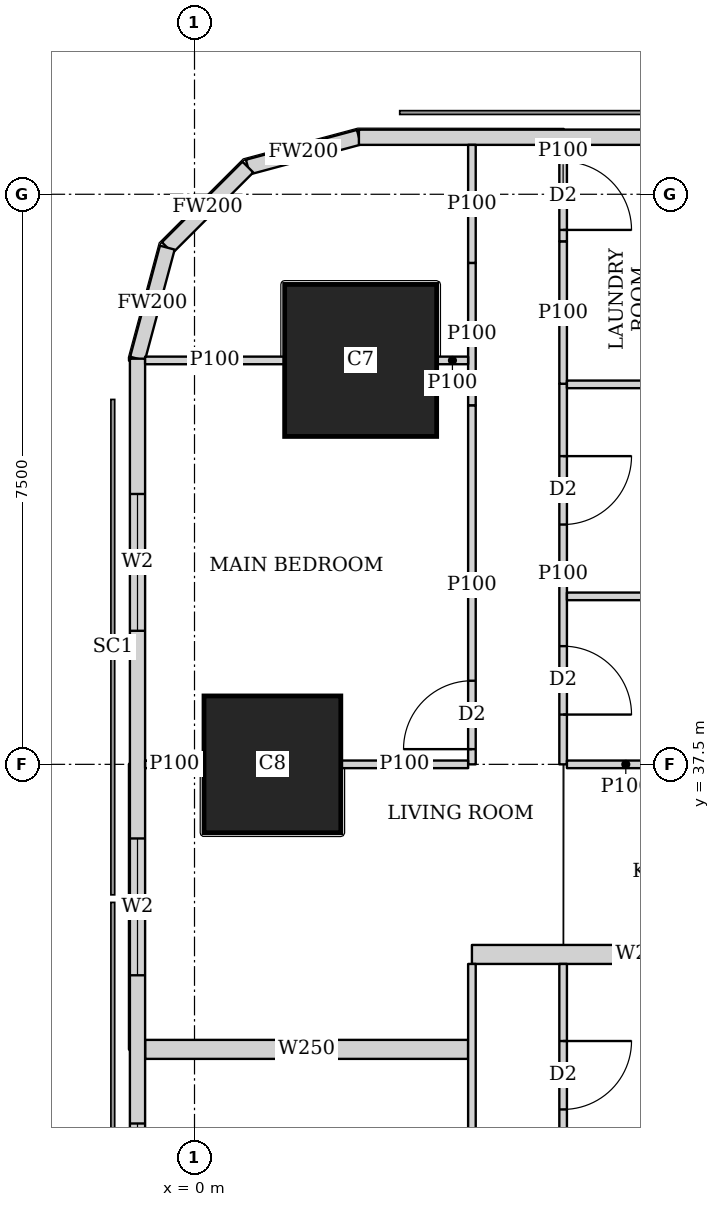
"""IFC4 building model, lengths in metres.
Left out: names, types, materials, properties, quantities, classifications, styles, units other than length and angle.
Written with IfcOpenShell. Run it as: python <this file> out.ifc"""

import sys

from ifc_helpers import new_model, si_unit, direction, frame, frame_2d, origin, origin_2d, place, context, subcontext, project, spatial, rectangle, extrude, element, fill, save


model = new_model("IFC4")
c1 = context("Model", 3, precision=1e-05, world=origin(), true_north=direction((0.0, 1.0)))
c2 = subcontext(c1, "Body", "Model", "MODEL_VIEW")
j1 = project(units=[si_unit("LENGTHUNIT", "METRE"), si_unit("PLANEANGLEUNIT", "RADIAN")], contexts=[c1])
p1 = place(None, origin())
s1 = spatial("IfcSite", under=j1, at=p1, CompositionType="ELEMENT")
p2 = place(p1, origin())
s2 = spatial("IfcBuilding", under=s1, at=p2, CompositionType="ELEMENT")
p3 = place(p2, frame((0.0, 0.0, 169.55)))
s3 = spatial("IfcBuildingStorey", under=s2, at=p3, CompositionType="ELEMENT", Elevation=169.55)
p4 = place(p3, frame((1.025, 37.5, 0.0), z_axis=(0.0, 0.0, 1.0), x_axis=(1.0, 0.0, 0.0)))
e1 = element("IfcColumn", 1, at=p4, inside=s3, PredefinedType="COLUMN", context=c2, shape_type="SweptSolid", body=[
    extrude(rectangle(XDim=1.8, YDim=1.8, at=origin_2d()), origin(), (0.0, 0.0, 1.0), 3.75),
])
p5 = place(p3, frame((2.186, 42.814, 0.0), z_axis=(0.0, 0.0, 1.0), x_axis=(1.0, 0.0, 0.0)))
e2 = element("IfcColumn", 2, at=p5, inside=s3, PredefinedType="COLUMN", context=c2, shape_type="SweptSolid", body=[
    extrude(rectangle(XDim=2.0, YDim=2.0, at=origin_2d()), origin(), (0.0, 0.0, 1.0), 3.75),
])
p6 = place(p3, frame((40.106, 45.75, 0.0), z_axis=(0.0, 0.0, 1.0), x_axis=(-1.0, 0.0, 0.0)))
e3 = element("IfcWall", 3, at=p6, inside=s3, PredefinedType="SOLIDWALL", context=c2, shape_type="SweptSolid", body=[
    extrude(rectangle(XDim=37.943, YDim=0.2, at=frame_2d((18.971, 0.0))), origin(), (0.0, 0.0, 1.0), 3.5),
])
p7 = place(p6, frame((8.606, 0.0, 0.9)))
e4 = element("IfcOpeningElement", 4, at=p7, cuts=e3, PredefinedType="OPENING", context=c2, shape_type="SweptSolid", body=[
    extrude(rectangle(XDim=1.8, YDim=1.5, at=frame_2d((0.9, 0.75))), frame((0.0, 0.11, 0.0), z_axis=(0.0, -1.0, 0.0), x_axis=(1.0, 0.0, 0.0)), (0.0, 0.0, 1.0), 0.22),
])
p8 = place(p6, frame((12.206, 0.0, 0.9)))
e5 = element("IfcOpeningElement", 5, at=p8, cuts=e3, PredefinedType="OPENING", context=c2, shape_type="SweptSolid", body=[
    extrude(rectangle(XDim=1.8, YDim=1.5, at=frame_2d((0.9, 0.75))), frame((0.0, 0.11, 0.0), z_axis=(0.0, -1.0, 0.0), x_axis=(1.0, 0.0, 0.0)), (0.0, 0.0, 1.0), 0.22),
])
p9 = place(p6, frame((15.806, 0.0, 0.9)))
e6 = element("IfcOpeningElement", 6, at=p9, cuts=e3, PredefinedType="OPENING", context=c2, shape_type="SweptSolid", body=[
    extrude(rectangle(XDim=1.8, YDim=1.5, at=frame_2d((0.9, 0.75))), frame((0.0, 0.11, 0.0), z_axis=(0.0, -1.0, 0.0), x_axis=(1.0, 0.0, 0.0)), (0.0, 0.0, 1.0), 0.22),
])
p10 = place(p6, frame((19.406, 0.0, 0.9)))
e7 = element("IfcOpeningElement", 7, at=p10, cuts=e3, PredefinedType="OPENING", context=c2, shape_type="SweptSolid", body=[
    extrude(rectangle(XDim=1.8, YDim=1.5, at=frame_2d((0.9, 0.75))), frame((0.0, 0.11, 0.0), z_axis=(0.0, -1.0, 0.0), x_axis=(1.0, 0.0, 0.0)), (0.0, 0.0, 1.0), 0.22),
])
p11 = place(p6, frame((23.006, 0.0, 0.9)))
e8 = element("IfcOpeningElement", 8, at=p11, cuts=e3, PredefinedType="OPENING", context=c2, shape_type="SweptSolid", body=[
    extrude(rectangle(XDim=1.8, YDim=1.5, at=frame_2d((0.9, 0.75))), frame((0.0, 0.11, 0.0), z_axis=(0.0, -1.0, 0.0), x_axis=(1.0, 0.0, 0.0)), (0.0, 0.0, 1.0), 0.22),
])
p12 = place(p6, frame((26.606, 0.0, 0.9)))
e9 = element("IfcOpeningElement", 9, at=p12, cuts=e3, PredefinedType="OPENING", context=c2, shape_type="SweptSolid", body=[
    extrude(rectangle(XDim=1.8, YDim=1.5, at=frame_2d((0.9, 0.75))), frame((0.0, 0.11, 0.0), z_axis=(0.0, -1.0, 0.0), x_axis=(1.0, 0.0, 0.0)), (0.0, 0.0, 1.0), 0.22),
])
p13 = place(p3, frame((2.163, 45.75, 0.0), z_axis=(0.0, 0.0, 1.0), x_axis=(-0.965832000415, -0.259168954497, 0.0)))
e10 = element("IfcWall", 10, at=p13, inside=s3, PredefinedType="SOLIDWALL", context=c2, shape_type="SweptSolid", body=[
    extrude(rectangle(XDim=1.513, YDim=0.2, at=frame_2d((0.756, 0.0))), origin(), (0.0, 0.0, 1.0), 3.5),
])
p14 = place(p3, frame((0.702, 45.358, 0.0), z_axis=(0.0, 0.0, 1.0), x_axis=(-0.707106781187, -0.707106781187, 0.0)))
e11 = element("IfcWall", 11, at=p14, inside=s3, PredefinedType="SOLIDWALL", context=c2, shape_type="SweptSolid", body=[
    extrude(rectangle(XDim=1.499, YDim=0.2, at=frame_2d((0.75, 0.0))), origin(), (0.0, 0.0, 1.0), 3.5),
])
p15 = place(p3, frame((-0.358, 44.298, 0.0), z_axis=(0.0, 0.0, 1.0), x_axis=(-0.259168954497, -0.965832000415, 0.0)))
e12 = element("IfcWall", 12, at=p15, inside=s3, PredefinedType="SOLIDWALL", context=c2, shape_type="SweptSolid", body=[
    extrude(rectangle(XDim=1.513, YDim=0.2, at=frame_2d((0.756, 0.0))), origin(), (0.0, 0.0, 1.0), 3.5),
])
p16 = place(p3, frame((-0.75, 42.837, 0.0), z_axis=(0.0, 0.0, 1.0), x_axis=(0.0, -1.0, 0.0)))
e13 = element("IfcWall", 13, at=p16, inside=s3, PredefinedType="SOLIDWALL", context=c2, shape_type="SweptSolid", body=[
    extrude(rectangle(XDim=40.674, YDim=0.2, at=frame_2d((20.337, 0.0))), origin(), (0.0, 0.0, 1.0), 3.5),
])
p17 = place(p16, frame((1.78, 0.0, 0.9)))
e14 = element("IfcOpeningElement", 14, at=p17, cuts=e13, PredefinedType="OPENING", context=c2, shape_type="SweptSolid", body=[
    extrude(rectangle(XDim=1.8, YDim=1.5, at=frame_2d((0.9, 0.75))), frame((0.0, 0.11, 0.0), z_axis=(0.0, -1.0, 0.0), x_axis=(1.0, 0.0, 0.0)), (0.0, 0.0, 1.0), 0.22),
])
p18 = place(p16, frame((6.312, 0.0, 0.9)))
e15 = element("IfcOpeningElement", 15, at=p18, cuts=e13, PredefinedType="OPENING", context=c2, shape_type="SweptSolid", body=[
    extrude(rectangle(XDim=1.8, YDim=1.5, at=frame_2d((0.9, 0.75))), frame((0.0, 0.11, 0.0), z_axis=(0.0, -1.0, 0.0), x_axis=(1.0, 0.0, 0.0)), (0.0, 0.0, 1.0), 0.22),
])
p19 = place(p16, frame((10.062, 0.0, 0.9)))
e16 = element("IfcOpeningElement", 16, at=p19, cuts=e13, PredefinedType="OPENING", context=c2, shape_type="SweptSolid", body=[
    extrude(rectangle(XDim=1.8, YDim=1.5, at=frame_2d((0.9, 0.75))), frame((0.0, 0.11, 0.0), z_axis=(0.0, -1.0, 0.0), x_axis=(1.0, 0.0, 0.0)), (0.0, 0.0, 1.0), 0.22),
])
p20 = place(p16, frame((13.812, 0.0, 0.9)))
e17 = element("IfcOpeningElement", 17, at=p20, cuts=e13, PredefinedType="OPENING", context=c2, shape_type="SweptSolid", body=[
    extrude(rectangle(XDim=1.8, YDim=1.5, at=frame_2d((0.9, 0.75))), frame((0.0, 0.11, 0.0), z_axis=(0.0, -1.0, 0.0), x_axis=(1.0, 0.0, 0.0)), (0.0, 0.0, 1.0), 0.22),
])
p21 = place(p16, frame((17.562, 0.0, 0.9)))
e18 = element("IfcOpeningElement", 18, at=p21, cuts=e13, PredefinedType="OPENING", context=c2, shape_type="SweptSolid", body=[
    extrude(rectangle(XDim=1.8, YDim=1.5, at=frame_2d((0.9, 0.75))), frame((0.0, 0.11, 0.0), z_axis=(0.0, -1.0, 0.0), x_axis=(1.0, 0.0, 0.0)), (0.0, 0.0, 1.0), 0.22),
])
p22 = place(p16, frame((21.312, 0.0, 0.9)))
e19 = element("IfcOpeningElement", 19, at=p22, cuts=e13, PredefinedType="OPENING", context=c2, shape_type="SweptSolid", body=[
    extrude(rectangle(XDim=1.8, YDim=1.5, at=frame_2d((0.9, 0.75))), frame((0.0, 0.11, 0.0), z_axis=(0.0, -1.0, 0.0), x_axis=(1.0, 0.0, 0.0)), (0.0, 0.0, 1.0), 0.22),
])
p23 = place(p16, frame((25.062, 0.0, 0.9)))
e20 = element("IfcOpeningElement", 20, at=p23, cuts=e13, PredefinedType="OPENING", context=c2, shape_type="SweptSolid", body=[
    extrude(rectangle(XDim=1.8, YDim=1.5, at=frame_2d((0.9, 0.75))), frame((0.0, 0.11, 0.0), z_axis=(0.0, -1.0, 0.0), x_axis=(1.0, 0.0, 0.0)), (0.0, 0.0, 1.0), 0.22),
])
p24 = place(p16, frame((28.812, 0.0, 0.9)))
e21 = element("IfcOpeningElement", 21, at=p24, cuts=e13, PredefinedType="OPENING", context=c2, shape_type="SweptSolid", body=[
    extrude(rectangle(XDim=1.8, YDim=1.5, at=frame_2d((0.9, 0.75))), frame((0.0, 0.11, 0.0), z_axis=(0.0, -1.0, 0.0), x_axis=(1.0, 0.0, 0.0)), (0.0, 0.0, 1.0), 0.22),
])
p25 = place(p16, frame((32.562, 0.0, 0.9)))
e22 = element("IfcOpeningElement", 22, at=p25, cuts=e13, PredefinedType="OPENING", context=c2, shape_type="SweptSolid", body=[
    extrude(rectangle(XDim=1.8, YDim=1.5, at=frame_2d((0.9, 0.75))), frame((0.0, 0.11, 0.0), z_axis=(0.0, -1.0, 0.0), x_axis=(1.0, 0.0, 0.0)), (0.0, 0.0, 1.0), 0.22),
])
p26 = place(p16, frame((37.094, 0.0, 0.9)))
e23 = element("IfcOpeningElement", 23, at=p26, cuts=e13, PredefinedType="OPENING", context=c2, shape_type="SweptSolid", body=[
    extrude(rectangle(XDim=1.8, YDim=1.5, at=frame_2d((0.9, 0.75))), frame((0.0, 0.11, 0.0), z_axis=(0.0, -1.0, 0.0), x_axis=(1.0, 0.0, 0.0)), (0.0, 0.0, 1.0), 0.22),
])
p27 = place(p3, frame((3.65, 26.25, 0.0), z_axis=(0.0, 0.0, 1.0), x_axis=(0.0, 1.0, 0.0)))
e24 = element("IfcWall", 24, at=p27, inside=s3, PredefinedType="PARTITIONING", context=c2, shape_type="SweptSolid", body=[
    extrude(rectangle(XDim=8.624, YDim=0.1, at=frame_2d((4.312, 0.0))), origin(), (0.0, 0.0, 1.0), 3.5),
])
p28 = place(p27, frame((1.449, 0.0, 0.0)))
e25 = element("IfcOpeningElement", 25, at=p28, cuts=e24, PredefinedType="OPENING", context=c2, shape_type="SweptSolid", body=[
    extrude(rectangle(XDim=0.9, YDim=2.1, at=frame_2d((0.45, 1.05))), frame((0.0, 0.06, 0.0), z_axis=(0.0, -1.0, 0.0), x_axis=(1.0, 0.0, 0.0)), (0.0, 0.0, 1.0), 0.12),
])
p29 = place(p27, frame((3.95, 0.0, 0.0)))
e26 = element("IfcOpeningElement", 26, at=p29, cuts=e24, PredefinedType="OPENING", context=c2, shape_type="SweptSolid", body=[
    extrude(rectangle(XDim=0.9, YDim=2.1, at=frame_2d((0.45, 1.05))), frame((0.0, 0.06, 0.0), z_axis=(0.0, -1.0, 0.0), x_axis=(1.0, 0.0, 0.0)), (0.0, 0.0, 1.0), 0.12),
])
p30 = place(p3, frame((4.85, 27.499, 0.0), z_axis=(0.0, 0.0, 1.0), x_axis=(0.0, 1.0, 0.0)))
e27 = element("IfcWall", 27, at=p30, inside=s3, PredefinedType="PARTITIONING", context=c2, shape_type="SweptSolid", body=[
    extrude(rectangle(XDim=7.375, YDim=0.1, at=frame_2d((3.688, 0.0))), origin(), (0.0, 0.0, 1.0), 3.5),
])
p31 = place(p30, frame((0.8, 0.0, 0.0)))
e28 = element("IfcOpeningElement", 28, at=p31, cuts=e27, PredefinedType="OPENING", context=c2, shape_type="SweptSolid", body=[
    extrude(rectangle(XDim=0.9, YDim=2.1, at=frame_2d((0.45, 1.05))), frame((0.0, 0.06, 0.0), z_axis=(0.0, -1.0, 0.0), x_axis=(1.0, 0.0, 0.0)), (0.0, 0.0, 1.0), 0.12),
])
p32 = place(p30, frame((2.961, 0.0, 0.0)))
e29 = element("IfcOpeningElement", 29, at=p32, cuts=e27, PredefinedType="OPENING", context=c2, shape_type="SweptSolid", body=[
    extrude(rectangle(XDim=0.9, YDim=2.1, at=frame_2d((0.45, 1.05))), frame((0.0, 0.06, 0.0), z_axis=(0.0, -1.0, 0.0), x_axis=(1.0, 0.0, 0.0)), (0.0, 0.0, 1.0), 0.12),
])
p33 = place(p30, frame((5.461, 0.0, 0.0)))
e30 = element("IfcOpeningElement", 30, at=p33, cuts=e27, PredefinedType="OPENING", context=c2, shape_type="SweptSolid", body=[
    extrude(rectangle(XDim=0.9, YDim=2.1, at=frame_2d((0.45, 1.05))), frame((0.0, 0.06, 0.0), z_axis=(0.0, -1.0, 0.0), x_axis=(1.0, 0.0, 0.0)), (0.0, 0.0, 1.0), 0.12),
])
p34 = place(p3, frame((3.65, 37.5, 0.0), z_axis=(0.0, 0.0, 1.0), x_axis=(0.0, 1.0, 0.0)))
e31 = element("IfcWall", 31, at=p34, inside=s3, PredefinedType="PARTITIONING", context=c2, shape_type="SweptSolid", body=[
    extrude(rectangle(XDim=4.724, YDim=0.1, at=frame_2d((2.362, 0.0))), origin(), (0.0, 0.0, 1.0), 3.5),
])
p35 = place(p34, frame((0.2, 0.0, 0.0)))
e32 = element("IfcOpeningElement", 32, at=p35, cuts=e31, PredefinedType="OPENING", context=c2, shape_type="SweptSolid", body=[
    extrude(rectangle(XDim=0.9, YDim=2.1, at=frame_2d((0.45, 1.05))), frame((0.0, 0.06, 0.0), z_axis=(0.0, -1.0, 0.0), x_axis=(1.0, 0.0, 0.0)), (0.0, 0.0, 1.0), 0.12),
])
p36 = place(p3, frame((3.65, 42.224, 0.0), z_axis=(0.0, 0.0, 1.0), x_axis=(0.0, 1.0, 0.0)))
e33 = element("IfcWall", 33, at=p36, inside=s3, PredefinedType="PARTITIONING", context=c2, shape_type="SweptSolid", body=[
    extrude(rectangle(XDim=1.873, YDim=0.1, at=frame_2d((0.937, 0.0))), origin(), (0.0, 0.0, 1.0), 2.1),
])
p37 = place(p3, frame((3.65, 44.097, 0.0), z_axis=(0.0, 0.0, 1.0), x_axis=(0.0, 1.0, 0.0)))
e34 = element("IfcWall", 34, at=p37, inside=s3, PredefinedType="PARTITIONING", context=c2, shape_type="SweptSolid", body=[
    extrude(rectangle(XDim=1.553, YDim=0.1, at=frame_2d((0.776, 0.0))), origin(), (0.0, 0.0, 1.0), 3.5),
])
p38 = place(p3, frame((4.85, 37.5, 0.0), z_axis=(0.0, 0.0, 1.0), x_axis=(0.0, 1.0, 0.0)))
e35 = element("IfcWall", 35, at=p38, inside=s3, PredefinedType="PARTITIONING", context=c2, shape_type="SweptSolid", body=[
    extrude(rectangle(XDim=5.007, YDim=0.1, at=frame_2d((2.503, 0.0))), origin(), (0.0, 0.0, 1.0), 3.5),
])
p39 = place(p38, frame((0.655, 0.0, 0.0)))
e36 = element("IfcOpeningElement", 36, at=p39, cuts=e35, PredefinedType="OPENING", context=c2, shape_type="SweptSolid", body=[
    extrude(rectangle(XDim=0.9, YDim=2.1, at=frame_2d((0.45, 1.05))), frame((0.0, 0.06, 0.0), z_axis=(0.0, -1.0, 0.0), x_axis=(1.0, 0.0, 0.0)), (0.0, 0.0, 1.0), 0.12),
])
p40 = place(p38, frame((3.155, 0.0, 0.0)))
e37 = element("IfcOpeningElement", 37, at=p40, cuts=e35, PredefinedType="OPENING", context=c2, shape_type="SweptSolid", body=[
    extrude(rectangle(XDim=0.9, YDim=2.1, at=frame_2d((0.45, 1.05))), frame((0.0, 0.06, 0.0), z_axis=(0.0, -1.0, 0.0), x_axis=(1.0, 0.0, 0.0)), (0.0, 0.0, 1.0), 0.12),
])
p41 = place(p3, frame((4.85, 42.507, 0.0), z_axis=(0.0, 0.0, 1.0), x_axis=(0.0, 1.0, 0.0)))
e38 = element("IfcWall", 38, at=p41, inside=s3, PredefinedType="PARTITIONING", context=c2, shape_type="SweptSolid", body=[
    extrude(rectangle(XDim=1.874, YDim=0.1, at=frame_2d((0.937, 0.0))), origin(), (0.0, 0.0, 1.0), 2.1),
])
p42 = place(p3, frame((4.85, 44.381, 0.0), z_axis=(0.0, 0.0, 1.0), x_axis=(0.0, 1.0, 0.0)))
e39 = element("IfcWall", 39, at=p42, inside=s3, PredefinedType="PARTITIONING", context=c2, shape_type="SweptSolid", body=[
    extrude(rectangle(XDim=1.269, YDim=0.1, at=frame_2d((0.634, 0.0))), origin(), (0.0, 0.0, 1.0), 3.5),
])
p43 = place(p42, frame((0.15, 0.0, 0.0)))
e40 = element("IfcOpeningElement", 40, at=p43, cuts=e39, PredefinedType="OPENING", context=c2, shape_type="SweptSolid", body=[
    extrude(rectangle(XDim=0.9, YDim=2.1, at=frame_2d((0.45, 1.05))), frame((0.0, 0.06, 0.0), z_axis=(0.0, -1.0, 0.0), x_axis=(1.0, 0.0, 0.0)), (0.0, 0.0, 1.0), 0.12),
])
p44 = place(p3, frame((-0.65, 37.5, 0.0), z_axis=(0.0, 0.0, 1.0), x_axis=(1.0, 0.0, 0.0)))
e41 = element("IfcWall", 41, at=p44, inside=s3, PredefinedType="PARTITIONING", context=c2, shape_type="SweptSolid", body=[
    extrude(rectangle(XDim=0.774, YDim=0.1, at=frame_2d((0.387, 0.0))), origin(), (0.0, 0.0, 1.0), 3.5),
])
p45 = place(p3, frame((1.926, 37.5, 0.0), z_axis=(0.0, 0.0, 1.0), x_axis=(1.0, 0.0, 0.0)))
e42 = element("IfcWall", 42, at=p45, inside=s3, PredefinedType="PARTITIONING", context=c2, shape_type="SweptSolid", body=[
    extrude(rectangle(XDim=1.674, YDim=0.1, at=frame_2d((0.837, 0.0))), origin(), (0.0, 0.0, 1.0), 2.1),
])
p46 = place(p3, frame((-0.65, 42.814, 0.0), z_axis=(0.0, 0.0, 1.0), x_axis=(1.0, 0.0, 0.0)))
e43 = element("IfcWall", 43, at=p46, inside=s3, PredefinedType="PARTITIONING", context=c2, shape_type="SweptSolid", body=[
    extrude(rectangle(XDim=1.835, YDim=0.1, at=frame_2d((0.917, 0.0))), origin(), (0.0, 0.0, 1.0), 3.5),
])
p47 = place(p3, frame((3.187, 42.814, 0.0), z_axis=(0.0, 0.0, 1.0), x_axis=(1.0, 0.0, 0.0)))
e44 = element("IfcWall", 44, at=p47, inside=s3, PredefinedType="PARTITIONING", context=c2, shape_type="SweptSolid", body=[
    extrude(rectangle(XDim=0.413, YDim=0.1, at=frame_2d((0.207, 0.0))), origin(), (0.0, 0.0, 1.0), 2.1),
])
p48 = place(p3, frame((4.9, 37.5, 0.0), z_axis=(0.0, 0.0, 1.0), x_axis=(1.0, 0.0, 0.0)))
e45 = element("IfcWall", 45, at=p48, inside=s3, PredefinedType="PARTITIONING", context=c2, shape_type="SweptSolid", body=[
    extrude(rectangle(XDim=1.549, YDim=0.1, at=frame_2d((0.774, 0.0))), origin(), (0.0, 0.0, 1.0), 3.5),
])
for number, where, z_axis, x_axis in (
    (46, (4.9, 42.499, 0.0), (0.0, 0.0, 1.0), (1.0, 0.0, 0.0)),
    (47, (4.9, 39.71, 0.0), (0.0, 0.0, 1.0), (1.0, 0.0, 0.0)),
):
    element("IfcWall", number, at=place(p3, frame(where, z_axis=z_axis, x_axis=x_axis)), inside=s3, PredefinedType="PARTITIONING", context=c2, shape_type="SweptSolid", body=[
        extrude(rectangle(XDim=3.275, YDim=0.1, at=frame_2d((1.638, 0.0))), origin(), (0.0, 0.0, 1.0), 3.5),
    ])
p49 = place(p3, frame((-0.65, 33.75, 0.0), z_axis=(0.0, 0.0, 1.0), x_axis=(1.0, 0.0, 0.0)))
e48 = element("IfcWall", 48, at=p49, inside=s3, PredefinedType="SOLIDWALL", context=c2, shape_type="SweptSolid", body=[
    extrude(rectangle(XDim=4.25, YDim=0.25, at=frame_2d((2.125, 0.0))), origin(), (0.0, 0.0, 1.0), 2.1),
])
p50 = place(p3, frame((3.65, 34.999, 0.0), z_axis=(0.0, 0.0, 1.0), x_axis=(1.0, 0.0, 0.0)))
e49 = element("IfcWall", 49, at=p50, inside=s3, PredefinedType="SOLIDWALL", context=c2, shape_type="SweptSolid", body=[
    extrude(rectangle(XDim=4.525, YDim=0.25, at=frame_2d((2.263, 0.0))), origin(), (0.0, 0.0, 1.0), 3.5),
])
p51 = place(p17, origin())
e50 = element("IfcWindow", 50, at=p51, inside=s3, PartitioningType="SINGLE_PANEL", PredefinedType="WINDOW", context=c2, shape_type="SweptSolid", body=[
    extrude(rectangle(XDim=1.8, YDim=1.5, at=frame_2d((0.9, 0.75))), frame((0.0, 0.03, 0.0), z_axis=(0.0, -1.0, 0.0), x_axis=(1.0, 0.0, 0.0)), (0.0, 0.0, 1.0), 0.06),
])
fill(e14, e50)
p52 = place(p18, origin())
e51 = element("IfcWindow", 51, at=p52, inside=s3, PartitioningType="SINGLE_PANEL", PredefinedType="WINDOW", context=c2, shape_type="SweptSolid", body=[
    extrude(rectangle(XDim=1.8, YDim=1.5, at=frame_2d((0.9, 0.75))), frame((0.0, 0.03, 0.0), z_axis=(0.0, -1.0, 0.0), x_axis=(1.0, 0.0, 0.0)), (0.0, 0.0, 1.0), 0.06),
])
fill(e15, e51)
p53 = place(p19, origin())
e52 = element("IfcWindow", 52, at=p53, inside=s3, PartitioningType="SINGLE_PANEL", PredefinedType="WINDOW", context=c2, shape_type="SweptSolid", body=[
    extrude(rectangle(XDim=1.8, YDim=1.5, at=frame_2d((0.9, 0.75))), frame((0.0, 0.03, 0.0), z_axis=(0.0, -1.0, 0.0), x_axis=(1.0, 0.0, 0.0)), (0.0, 0.0, 1.0), 0.06),
])
fill(e16, e52)
p54 = place(p33, origin())
e53 = element("IfcDoor", 53, at=p54, inside=s3, OperationType="SINGLE_SWING_LEFT", PredefinedType="DOOR", context=c2, shape_type="SweptSolid", body=[
    extrude(rectangle(XDim=0.9, YDim=2.1, at=frame_2d((0.45, 1.05))), frame((0.0, 0.025, 0.0), z_axis=(0.0, -1.0, 0.0), x_axis=(1.0, 0.0, 0.0)), (0.0, 0.0, 1.0), 0.05),
])
fill(e30, e53)
p55 = place(p35, origin())
e54 = element("IfcDoor", 54, at=p55, inside=s3, OperationType="SINGLE_SWING_LEFT", PredefinedType="DOOR", context=c2, shape_type="SweptSolid", body=[
    extrude(rectangle(XDim=0.9, YDim=2.1, at=frame_2d((0.45, 1.05))), frame((0.0, 0.025, 0.0), z_axis=(0.0, -1.0, 0.0), x_axis=(1.0, 0.0, 0.0)), (0.0, 0.0, 1.0), 0.05),
])
fill(e32, e54)
p56 = place(p39, origin())
e55 = element("IfcDoor", 55, at=p56, inside=s3, OperationType="SINGLE_SWING_RIGHT", PredefinedType="DOOR", context=c2, shape_type="SweptSolid", body=[
    extrude(rectangle(XDim=0.9, YDim=2.1, at=frame_2d((0.45, 1.05))), frame((0.0, 0.025, 0.0), z_axis=(0.0, -1.0, 0.0), x_axis=(1.0, 0.0, 0.0)), (0.0, 0.0, 1.0), 0.05),
])
fill(e36, e55)
p57 = place(p43, origin())
e56 = element("IfcDoor", 56, at=p57, inside=s3, OperationType="SINGLE_SWING_RIGHT", PredefinedType="DOOR", context=c2, shape_type="SweptSolid", body=[
    extrude(rectangle(XDim=0.9, YDim=2.1, at=frame_2d((0.45, 1.05))), frame((0.0, 0.025, 0.0), z_axis=(0.0, -1.0, 0.0), x_axis=(1.0, 0.0, 0.0)), (0.0, 0.0, 1.0), 0.05),
])
fill(e40, e56)
p58 = place(p40, origin())
e57 = element("IfcDoor", 57, at=p58, inside=s3, OperationType="SINGLE_SWING_LEFT", PredefinedType="DOOR", context=c2, shape_type="SweptSolid", body=[
    extrude(rectangle(XDim=0.9, YDim=2.1, at=frame_2d((0.45, 1.05))), frame((0.0, 0.025, 0.0), z_axis=(0.0, -1.0, 0.0), x_axis=(1.0, 0.0, 0.0)), (0.0, 0.0, 1.0), 0.05),
])
fill(e37, e57)
save(model, sys.argv[1])
